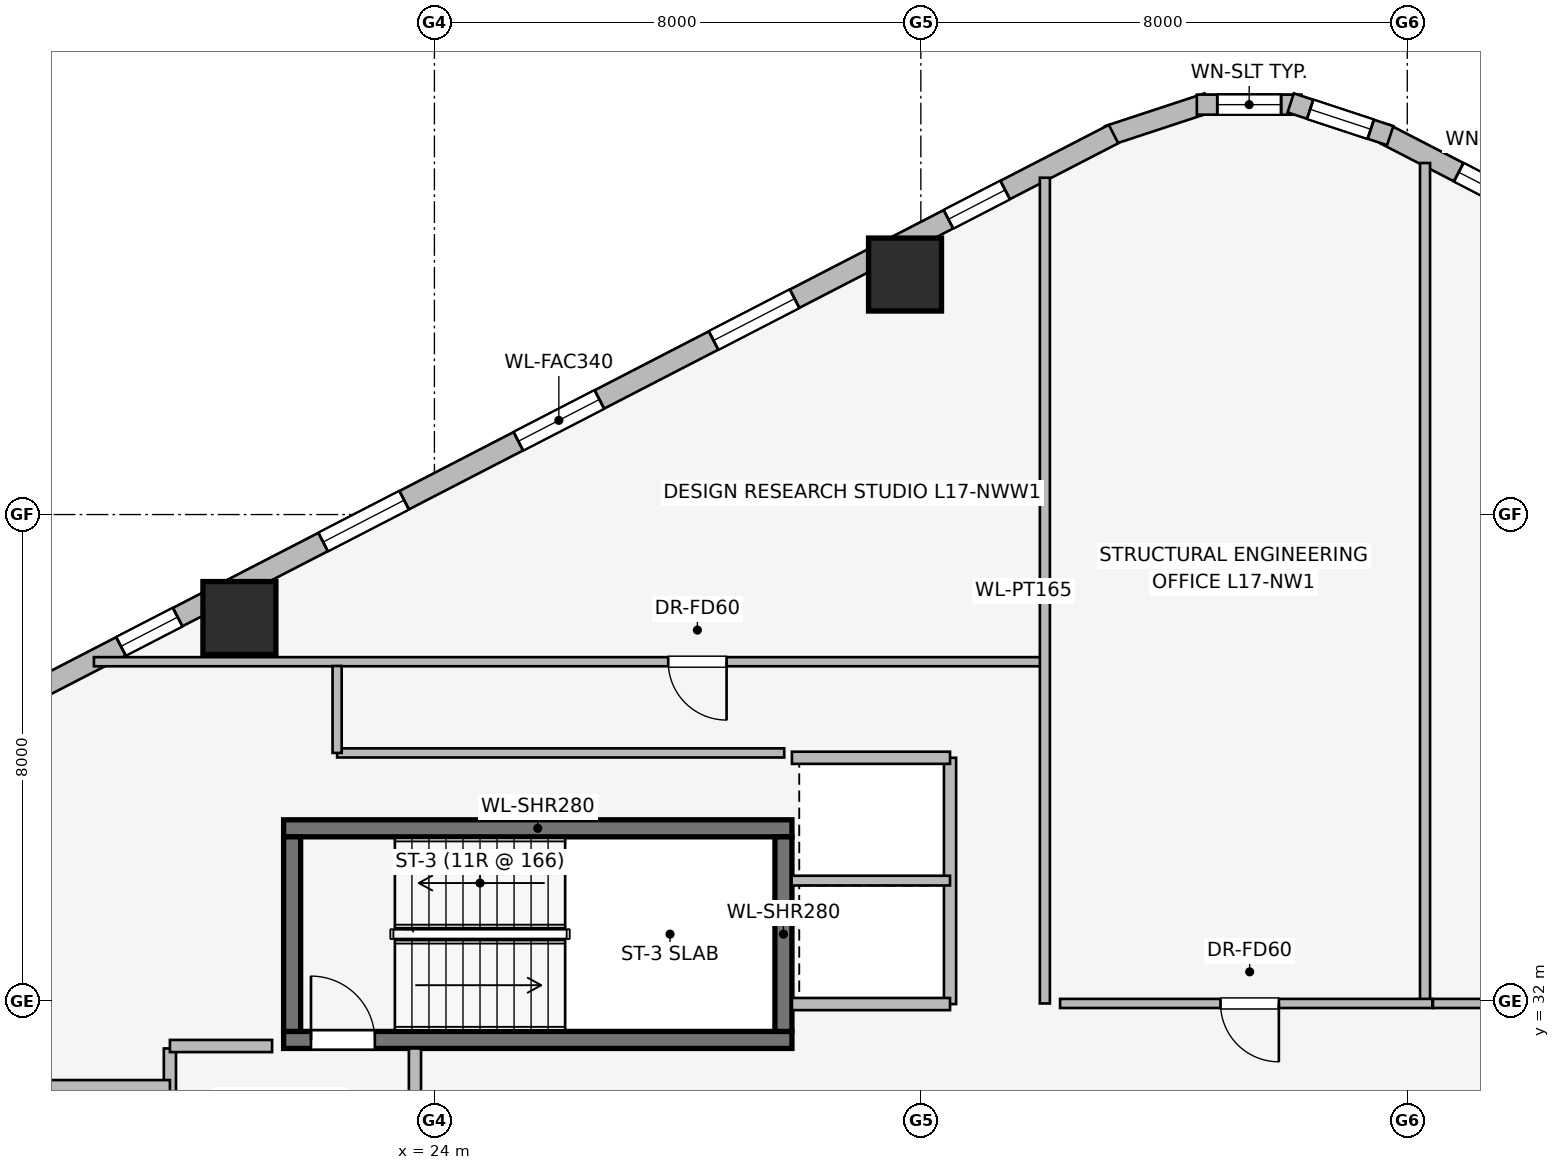
"""IFC4 building model, lengths in metres.
Left out: names, types, materials, properties, quantities, classifications, styles, units other than length and angle.
Written with IfcOpenShell. Run it as: python <this file> out.ifc"""

import sys

from ifc_helpers import new_model, si_unit, direction, frame, frame_2d, origin, origin_2d, place, context, subcontext, project, spatial, rectangle, extrude, element, fill, save


model = new_model("IFC4")
c1 = context("Model", 3, precision=1e-05, world=origin(), true_north=direction((0.0, 1.0)))
c2 = subcontext(c1, "Body", "Model", "MODEL_VIEW")
j1 = project(units=[si_unit("LENGTHUNIT", "METRE"), si_unit("PLANEANGLEUNIT", "RADIAN")], contexts=[c1])
p1 = place(None, origin())
s1 = spatial("IfcSite", under=j1, at=p1, CompositionType="ELEMENT")
p2 = place(p1, origin())
s2 = spatial("IfcBuilding", under=s1, at=p2, CompositionType="ELEMENT")
p3 = place(p2, frame((0.0, 0.0, 67.15)))
s3 = spatial("IfcBuildingStorey", under=s2, at=p3, CompositionType="ELEMENT", Elevation=67.15)
p4 = place(p3, frame((21.52, 31.36, 0.0), z_axis=(0.0, 0.0, 1.0), x_axis=(1.0, 0.0, 0.0)))
e1 = element("IfcWall", 1, at=p4, inside=s3, PredefinedType="SHEAR", context=c2, shape_type="SweptSolid", body=[
    extrude(rectangle(XDim=8.36, YDim=0.28, at=frame_2d((4.18, 0.0))), origin(), (0.0, 0.0, 1.0), 3.65),
])
p5 = place(p4, frame((0.45, 0.0, 0.0)))
e2 = element("IfcOpeningElement", 2, at=p5, cuts=e1, PredefinedType="OPENING", context=c2, shape_type="SweptSolid", body=[
    extrude(rectangle(XDim=1.05, YDim=2.0, at=frame_2d((0.525, 1.0))), frame((0.0, 0.15, 0.0), z_axis=(0.0, -1.0, 0.0), x_axis=(1.0, 0.0, 0.0)), (0.0, 0.0, 1.0), 0.3),
])
p6 = place(p3, frame((29.88, 34.84, 0.0), z_axis=(0.0, 0.0, 1.0), x_axis=(-1.0, 0.0, 0.0)))
e3 = element("IfcWall", 3, at=p6, inside=s3, PredefinedType="SHEAR", context=c2, shape_type="SweptSolid", body=[
    extrude(rectangle(XDim=8.36, YDim=0.28, at=frame_2d((4.18, 0.0))), origin(), (0.0, 0.0, 1.0), 3.65),
])
for number, where, z_axis, x_axis in (
    (4, (21.66, 34.7, 0.0), (0.0, 0.0, 1.0), (0.0, -1.0, 0.0)),
    (5, (29.74, 31.5, 0.0), (0.0, 0.0, 1.0), (0.0, 1.0, 0.0)),
):
    element("IfcWall", number, at=place(p3, frame(where, z_axis=z_axis, x_axis=x_axis)), inside=s3, PredefinedType="SHEAR", context=c2, shape_type="SweptSolid", body=[
        extrude(rectangle(XDim=3.2, YDim=0.28, at=frame_2d((1.6, 0.0))), origin(), (0.0, 0.0, 1.0), 3.65),
    ])
for number, where, z_axis, x_axis in (
    (6, (31.74, 43.947, 0.0), (0.0, 0.0, 1.0), (1.0, 0.0, 0.0)),
    (7, (20.793, 38.298, 0.0), (0.0, 0.0, 1.0), (1.0, 0.0, 0.0)),
):
    element("IfcColumn", number, at=place(p3, frame(where, z_axis=z_axis, x_axis=x_axis)), inside=s3, PredefinedType="COLUMN", context=c2, shape_type="SweptSolid", body=[
        extrude(rectangle(XDim=1.2, YDim=1.2, at=origin_2d()), origin(), (0.0, 0.0, 1.0), 3.65),
    ])
p7 = place(p3, frame((39.631, 46.257, 0.0), z_axis=(0.0, 0.0, 1.0), x_axis=(0.888634413993, -0.458616264721, 0.0)))
e8 = element("IfcWall", 8, at=p7, inside=s3, PredefinedType="STANDARD", context=c2, shape_type="SweptSolid", body=[
    extrude(rectangle(XDim=20.531, YDim=0.34, at=frame_2d((10.266, 0.0))), origin(), (0.0, 0.0, 1.0), 2.684),
])
p8 = place(p7, frame((1.367, 0.0, 0.75)))
e9 = element("IfcOpeningElement", 9, at=p8, cuts=e8, PredefinedType="OPENING", context=c2, shape_type="SweptSolid", body=[
    extrude(rectangle(XDim=1.8, YDim=1.5, at=frame_2d((0.9, 0.75))), frame((0.0, 0.18, 0.0), z_axis=(0.0, -1.0, 0.0), x_axis=(1.0, 0.0, 0.0)), (0.0, 0.0, 1.0), 0.36),
])
p9 = place(p7, frame((5.207, 0.0, 0.75)))
e10 = element("IfcOpeningElement", 10, at=p9, cuts=e8, PredefinedType="OPENING", context=c2, shape_type="SweptSolid", body=[
    extrude(rectangle(XDim=1.5, YDim=1.5, at=frame_2d((0.75, 0.75))), frame((0.0, 0.18, 0.0), z_axis=(0.0, -1.0, 0.0), x_axis=(1.0, 0.0, 0.0)), (0.0, 0.0, 1.0), 0.36),
])
p10 = place(p7, frame((7.429, 0.0, 0.75)))
e11 = element("IfcOpeningElement", 11, at=p10, cuts=e8, PredefinedType="OPENING", context=c2, shape_type="SweptSolid", body=[
    extrude(rectangle(XDim=1.5, YDim=1.5, at=frame_2d((0.75, 0.75))), frame((0.0, 0.18, 0.0), z_axis=(0.0, -1.0, 0.0), x_axis=(1.0, 0.0, 0.0)), (0.0, 0.0, 1.0), 0.36),
])
p11 = place(p7, frame((9.65, 0.0, 0.75)))
e12 = element("IfcOpeningElement", 12, at=p11, cuts=e8, PredefinedType="OPENING", context=c2, shape_type="SweptSolid", body=[
    extrude(rectangle(XDim=1.5, YDim=1.5, at=frame_2d((0.75, 0.75))), frame((0.0, 0.18, 0.0), z_axis=(0.0, -1.0, 0.0), x_axis=(1.0, 0.0, 0.0)), (0.0, 0.0, 1.0), 0.36),
])
p12 = place(p7, frame((13.06, 0.0, 0.75)))
e13 = element("IfcOpeningElement", 13, at=p12, cuts=e8, PredefinedType="OPENING", context=c2, shape_type="SweptSolid", body=[
    extrude(rectangle(XDim=1.8, YDim=1.5, at=frame_2d((0.9, 0.75))), frame((0.0, 0.18, 0.0), z_axis=(0.0, -1.0, 0.0), x_axis=(1.0, 0.0, 0.0)), (0.0, 0.0, 1.0), 0.36),
])
p13 = place(p7, frame((17.98, 0.0, 0.75)))
e14 = element("IfcOpeningElement", 14, at=p13, cuts=e8, PredefinedType="OPENING", context=c2, shape_type="SweptSolid", body=[
    extrude(rectangle(XDim=1.5, YDim=1.5, at=frame_2d((0.75, 0.75))), frame((0.0, 0.18, 0.0), z_axis=(0.0, -1.0, 0.0), x_axis=(1.0, 0.0, 0.0)), (0.0, 0.0, 1.0), 0.36),
])
p14 = place(p3, frame((35.081, 46.231, 0.0), z_axis=(0.0, 0.0, 1.0), x_axis=(0.94976901097, 0.312951794691, 0.0)))
e15 = element("IfcWall", 15, at=p14, inside=s3, PredefinedType="STANDARD", context=c2, shape_type="SweptSolid", body=[
    extrude(rectangle(XDim=1.722, YDim=0.33, at=frame_2d((0.861, 0.0))), origin(), (0.0, 0.0, 1.0), 3.39),
])
p15 = place(p3, frame((36.539, 46.741, 0.0), z_axis=(0.0, 0.0, 1.0), x_axis=(1.0, 0.0, 0.0)))
e16 = element("IfcWall", 16, at=p15, inside=s3, PredefinedType="STANDARD", context=c2, shape_type="SweptSolid", body=[
    extrude(rectangle(XDim=1.722, YDim=0.33, at=frame_2d((0.861, 0.0))), origin(), (0.0, 0.0, 1.0), 3.39),
])
p16 = place(p15, frame((0.336, 0.0, 0.75)))
e17 = element("IfcOpeningElement", 17, at=p16, cuts=e16, PredefinedType="OPENING", context=c2, shape_type="SweptSolid", body=[
    extrude(rectangle(XDim=1.05, YDim=1.4, at=frame_2d((0.525, 0.7))), frame((0.0, 0.175, 0.0), z_axis=(0.0, -1.0, 0.0), x_axis=(1.0, 0.0, 0.0)), (0.0, 0.0, 1.0), 0.35),
])
p17 = place(p3, frame((38.083, 46.77, 0.0), z_axis=(0.0, 0.0, 1.0), x_axis=(0.94976901097, -0.312951794691, 0.0)))
e18 = element("IfcWall", 18, at=p17, inside=s3, PredefinedType="STANDARD", context=c2, shape_type="SweptSolid", body=[
    extrude(rectangle(XDim=1.722, YDim=0.33, at=frame_2d((0.861, 0.0))), origin(), (0.0, 0.0, 1.0), 3.39),
])
p18 = place(p17, frame((0.336, 0.0, 0.75)))
e19 = element("IfcOpeningElement", 19, at=p18, cuts=e18, PredefinedType="OPENING", context=c2, shape_type="SweptSolid", body=[
    extrude(rectangle(XDim=1.05, YDim=1.4, at=frame_2d((0.525, 0.7))), frame((0.0, 0.175, 0.0), z_axis=(0.0, -1.0, 0.0), x_axis=(1.0, 0.0, 0.0)), (0.0, 0.0, 1.0), 0.35),
])
p19 = place(p3, frame((16.924, 36.841, 0.0), z_axis=(0.0, 0.0, 1.0), x_axis=(0.888634413993, 0.458616264721, 0.0)))
e20 = element("IfcWall", 20, at=p19, inside=s3, PredefinedType="STANDARD", context=c2, shape_type="SweptSolid", body=[
    extrude(rectangle(XDim=20.531, YDim=0.34, at=frame_2d((10.266, 0.0))), origin(), (0.0, 0.0, 1.0), 2.684),
])
p20 = place(p19, frame((2.161, 0.0, 0.75)))
e21 = element("IfcOpeningElement", 21, at=p20, cuts=e20, PredefinedType="OPENING", context=c2, shape_type="SweptSolid", body=[
    extrude(rectangle(XDim=1.05, YDim=1.4, at=frame_2d((0.525, 0.7))), frame((0.0, 0.18, 0.0), z_axis=(0.0, -1.0, 0.0), x_axis=(1.0, 0.0, 0.0)), (0.0, 0.0, 1.0), 0.36),
])
p21 = place(p19, frame((5.903, 0.0, 0.75)))
e22 = element("IfcOpeningElement", 22, at=p21, cuts=e20, PredefinedType="OPENING", context=c2, shape_type="SweptSolid", body=[
    extrude(rectangle(XDim=1.5, YDim=1.5, at=frame_2d((0.75, 0.75))), frame((0.0, 0.18, 0.0), z_axis=(0.0, -1.0, 0.0), x_axis=(1.0, 0.0, 0.0)), (0.0, 0.0, 1.0), 0.36),
])
p22 = place(p19, frame((9.516, 0.0, 0.75)))
e23 = element("IfcOpeningElement", 23, at=p22, cuts=e20, PredefinedType="OPENING", context=c2, shape_type="SweptSolid", body=[
    extrude(rectangle(XDim=1.5, YDim=1.5, at=frame_2d((0.75, 0.75))), frame((0.0, 0.18, 0.0), z_axis=(0.0, -1.0, 0.0), x_axis=(1.0, 0.0, 0.0)), (0.0, 0.0, 1.0), 0.36),
])
p23 = place(p19, frame((13.129, 0.0, 0.75)))
e24 = element("IfcOpeningElement", 24, at=p23, cuts=e20, PredefinedType="OPENING", context=c2, shape_type="SweptSolid", body=[
    extrude(rectangle(XDim=1.5, YDim=1.5, at=frame_2d((0.75, 0.75))), frame((0.0, 0.18, 0.0), z_axis=(0.0, -1.0, 0.0), x_axis=(1.0, 0.0, 0.0)), (0.0, 0.0, 1.0), 0.36),
])
p24 = place(p19, frame((17.476, 0.0, 0.75)))
e25 = element("IfcOpeningElement", 25, at=p24, cuts=e20, PredefinedType="OPENING", context=c2, shape_type="SweptSolid", body=[
    extrude(rectangle(XDim=1.05, YDim=1.4, at=frame_2d((0.525, 0.7))), frame((0.0, 0.18, 0.0), z_axis=(0.0, -1.0, 0.0), x_axis=(1.0, 0.0, 0.0)), (0.0, 0.0, 1.0), 0.36),
])
p25 = place(p3, frame((19.65, 25.68, 0.0), z_axis=(0.0, 0.0, 1.0), x_axis=(0.0, 1.0, 0.0)))
e26 = element("IfcWall", 26, at=p25, inside=s3, PredefinedType="PARTITIONING", context=c2, shape_type="SweptSolid", body=[
    extrude(rectangle(XDim=5.54, YDim=0.2, at=frame_2d((2.77, 0.0))), origin(), (0.0, 0.0, 1.0), 3.39),
])
p26 = place(p25, frame((0.62, 0.0, 0.0)))
e27 = element("IfcOpeningElement", 27, at=p26, cuts=e26, PredefinedType="OPENING", context=c2, shape_type="SweptSolid", body=[
    extrude(rectangle(XDim=1.1, YDim=2.2, at=frame_2d((0.55, 1.1))), frame((0.0, 0.11, 0.0), z_axis=(0.0, -1.0, 0.0), x_axis=(1.0, 0.0, 0.0)), (0.0, 0.0, 1.0), 0.22),
])
p27 = place(p25, frame((3.12, 0.0, 0.0)))
e28 = element("IfcOpeningElement", 28, at=p27, cuts=e26, PredefinedType="OPENING", context=c2, shape_type="SweptSolid", body=[
    extrude(rectangle(XDim=1.1, YDim=2.2, at=frame_2d((0.55, 1.1))), frame((0.0, 0.11, 0.0), z_axis=(0.0, -1.0, 0.0), x_axis=(1.0, 0.0, 0.0)), (0.0, 0.0, 1.0), 0.22),
])
p28 = place(p3, frame((23.68, 25.68, 0.0), z_axis=(0.0, 0.0, 1.0), x_axis=(0.0, 1.0, 0.0)))
e29 = element("IfcWall", 29, at=p28, inside=s3, PredefinedType="PARTITIONING", context=c2, shape_type="SweptSolid", body=[
    extrude(rectangle(XDim=5.54, YDim=0.2, at=frame_2d((2.77, 0.0))), origin(), (0.0, 0.0, 1.0), 3.39),
])
p29 = place(p28, frame((1.8, 0.0, 0.0)))
e30 = element("IfcOpeningElement", 30, at=p29, cuts=e29, PredefinedType="OPENING", context=c2, shape_type="SweptSolid", body=[
    extrude(rectangle(XDim=1.05, YDim=2.0, at=frame_2d((0.525, 1.0))), frame((0.0, 0.11, 0.0), z_axis=(0.0, -1.0, 0.0), x_axis=(1.0, 0.0, 0.0)), (0.0, 0.0, 1.0), 0.22),
])
p30 = place(p3, frame((21.33, 31.26, 0.0), z_axis=(0.0, 0.0, 1.0), x_axis=(-1.0, 0.0, 0.0)))
e31 = element("IfcWall", 31, at=p30, inside=s3, PredefinedType="PARTITIONING", context=c2, shape_type="SweptSolid", body=[
    extrude(rectangle(XDim=1.68, YDim=0.2, at=frame_2d((0.84, 0.0))), origin(), (0.0, 0.0, 1.0), 3.39),
])
p31 = place(p3, frame((19.65, 30.6, 0.0), z_axis=(0.0, 0.0, 1.0), x_axis=(-1.0, 0.0, 0.0)))
e32 = element("IfcWall", 32, at=p31, inside=s3, PredefinedType="PARTITIONING", context=c2, shape_type="SweptSolid", body=[
    extrude(rectangle(XDim=2.5, YDim=0.2, at=frame_2d((1.25, 0.0))), origin(), (0.0, 0.0, 1.0), 2.29),
])
p32 = place(p3, frame((32.48, 31.95, 0.0), z_axis=(0.0, 0.0, 1.0), x_axis=(0.0, 1.0, 0.0)))
e33 = element("IfcWall", 33, at=p32, inside=s3, PredefinedType="PARTITIONING", context=c2, shape_type="SweptSolid", body=[
    extrude(rectangle(XDim=4.05, YDim=0.2, at=frame_2d((2.025, 0.0))), origin(), (0.0, 0.0, 1.0), 2.513),
])
for number, where, z_axis, x_axis in (
    (34, (29.88, 36.0, 0.0), (0.0, 0.0, 1.0), (1.0, 0.0, 0.0)),
    (35, (32.48, 31.95, 0.0), (0.0, 0.0, 1.0), (-1.0, 0.0, 0.0)),
):
    element("IfcWall", number, at=place(p3, frame(where, z_axis=z_axis, x_axis=x_axis)), inside=s3, PredefinedType="PARTITIONING", context=c2, shape_type="SweptSolid", body=[
        extrude(rectangle(XDim=2.6, YDim=0.2, at=frame_2d((1.3, 0.0))), origin(), (0.0, 0.0, 1.0), 3.39),
    ])
p33 = place(p3, frame((29.875, 33.98, 0.0), z_axis=(0.0, 0.0, 1.0), x_axis=(1.0, 0.0, 0.0)))
e36 = element("IfcWall", 36, at=p33, inside=s3, PredefinedType="PARTITIONING", context=c2, shape_type="SweptSolid", body=[
    extrude(rectangle(XDim=2.605, YDim=0.16, at=frame_2d((1.302, 0.0))), origin(), (0.0, 0.0, 1.0), 3.39),
])
p34 = place(p3, frame((34.0, 37.58, 0.0), z_axis=(0.0, 0.0, 1.0), x_axis=(-1.0, 0.0, 0.0)))
e37 = element("IfcWall", 37, at=p34, inside=s3, PredefinedType="PARTITIONING", context=c2, shape_type="SweptSolid", body=[
    extrude(rectangle(XDim=15.6, YDim=0.15, at=frame_2d((7.8, 0.0))), origin(), (0.0, 0.0, 1.0), 3.39),
])
p35 = place(p34, frame((5.195, 0.0, 0.0)))
e38 = element("IfcOpeningElement", 38, at=p35, cuts=e37, PredefinedType="OPENING", context=c2, shape_type="SweptSolid", body=[
    extrude(rectangle(XDim=0.96, YDim=2.0, at=frame_2d((0.48, 1.0))), frame((0.0, 0.085, 0.0), z_axis=(0.0, -1.0, 0.0), x_axis=(1.0, 0.0, 0.0)), (0.0, 0.0, 1.0), 0.17),
])
p36 = place(p3, frame((34.04, 31.96, 0.0), z_axis=(0.0, 0.0, 1.0), x_axis=(0.0, 1.0, 0.0)))
e39 = element("IfcWall", 39, at=p36, inside=s3, PredefinedType="PARTITIONING", context=c2, shape_type="SweptSolid", body=[
    extrude(rectangle(XDim=13.579, YDim=0.165, at=frame_2d((6.79, 0.0))), origin(), (0.0, 0.0, 1.0), 3.39),
])
p37 = place(p3, frame((40.292, 31.97, 0.0), z_axis=(0.0, 0.0, 1.0), x_axis=(0.0, 1.0, 0.0)))
e40 = element("IfcWall", 40, at=p37, inside=s3, PredefinedType="PARTITIONING", context=c2, shape_type="SweptSolid", body=[
    extrude(rectangle(XDim=13.811, YDim=0.165, at=frame_2d((6.906, 0.0))), origin(), (0.0, 0.0, 1.0), 2.513),
])
p38 = place(p3, frame((40.412, 31.96, 0.0), z_axis=(0.0, 0.0, 1.0), x_axis=(-1.0, 0.0, 0.0)))
e41 = element("IfcWall", 41, at=p38, inside=s3, PredefinedType="PARTITIONING", context=c2, shape_type="SweptSolid", body=[
    extrude(rectangle(XDim=6.122, YDim=0.15, at=frame_2d((3.061, 0.0))), origin(), (0.0, 0.0, 1.0), 3.39),
])
p39 = place(p38, frame((2.524, 0.0, 0.0)))
e42 = element("IfcOpeningElement", 42, at=p39, cuts=e41, PredefinedType="OPENING", context=c2, shape_type="SweptSolid", body=[
    extrude(rectangle(XDim=0.96, YDim=2.0, at=frame_2d((0.48, 1.0))), frame((0.0, 0.085, 0.0), z_axis=(0.0, -1.0, 0.0), x_axis=(1.0, 0.0, 0.0)), (0.0, 0.0, 1.0), 0.17),
])
p40 = place(p3, frame((50.111, 31.96, 0.0), z_axis=(0.0, 0.0, 1.0), x_axis=(-1.0, 0.0, 0.0)))
e43 = element("IfcWall", 43, at=p40, inside=s3, PredefinedType="PARTITIONING", context=c2, shape_type="SweptSolid", body=[
    extrude(rectangle(XDim=9.689, YDim=0.15, at=frame_2d((4.844, 0.0))), origin(), (0.0, 0.0, 1.0), 3.39),
])
p41 = place(p40, frame((4.422, 0.0, 0.0)))
e44 = element("IfcOpeningElement", 44, at=p41, cuts=e43, PredefinedType="OPENING", context=c2, shape_type="SweptSolid", body=[
    extrude(rectangle(XDim=0.96, YDim=2.0, at=frame_2d((0.48, 1.0))), frame((0.0, 0.085, 0.0), z_axis=(0.0, -1.0, 0.0), x_axis=(1.0, 0.0, 0.0)), (0.0, 0.0, 1.0), 0.17),
])
p42 = place(p3, frame((29.753, 36.08, 0.0), z_axis=(0.0, 0.0, 1.0), x_axis=(-1.0, 0.0, 0.0)))
e45 = element("IfcWall", 45, at=p42, inside=s3, PredefinedType="PARTITIONING", context=c2, shape_type="SweptSolid", body=[
    extrude(rectangle(XDim=7.353, YDim=0.15, at=frame_2d((3.677, 0.0))), origin(), (0.0, 0.0, 1.0), 3.39),
])
p43 = place(p3, frame((22.4, 36.08, 0.0), z_axis=(0.0, 0.0, 1.0), x_axis=(0.0, 1.0, 0.0)))
e46 = element("IfcWall", 46, at=p43, inside=s3, PredefinedType="PARTITIONING", context=c2, shape_type="SweptSolid", body=[
    extrude(rectangle(XDim=1.43, YDim=0.15, at=frame_2d((0.715, 0.0))), origin(), (0.0, 0.0, 1.0), 3.39),
])
p44 = place(p8, origin())
e47 = element("IfcWindow", 47, at=p44, inside=s3, PartitioningType="SINGLE_PANEL", PredefinedType="WINDOW", context=c2, shape_type="SweptSolid", body=[
    extrude(rectangle(XDim=1.8, YDim=1.5, at=frame_2d((0.9, 0.75))), frame((0.0, 0.03, 0.0), z_axis=(0.0, -1.0, 0.0), x_axis=(1.0, 0.0, 0.0)), (0.0, 0.0, 1.0), 0.06),
])
fill(e9, e47)
p45 = place(p16, origin())
e48 = element("IfcWindow", 48, at=p45, inside=s3, PartitioningType="SINGLE_PANEL", PredefinedType="WINDOW", context=c2, shape_type="SweptSolid", body=[
    extrude(rectangle(XDim=1.05, YDim=1.4, at=frame_2d((0.525, 0.7))), frame((0.0, 0.03, 0.0), z_axis=(0.0, -1.0, 0.0), x_axis=(1.0, 0.0, 0.0)), (0.0, 0.0, 1.0), 0.06),
])
fill(e17, e48)
p46 = place(p18, origin())
e49 = element("IfcWindow", 49, at=p46, inside=s3, PartitioningType="SINGLE_PANEL", PredefinedType="WINDOW", context=c2, shape_type="SweptSolid", body=[
    extrude(rectangle(XDim=1.05, YDim=1.4, at=frame_2d((0.525, 0.7))), frame((0.0, 0.03, 0.0), z_axis=(0.0, -1.0, 0.0), x_axis=(1.0, 0.0, 0.0)), (0.0, 0.0, 1.0), 0.06),
])
fill(e19, e49)
p47 = place(p20, origin())
e50 = element("IfcWindow", 50, at=p47, inside=s3, PartitioningType="SINGLE_PANEL", PredefinedType="WINDOW", context=c2, shape_type="SweptSolid", body=[
    extrude(rectangle(XDim=1.05, YDim=1.4, at=frame_2d((0.525, 0.7))), frame((0.0, 0.03, 0.0), z_axis=(0.0, -1.0, 0.0), x_axis=(1.0, 0.0, 0.0)), (0.0, 0.0, 1.0), 0.06),
])
fill(e21, e50)
p48 = place(p21, origin())
e51 = element("IfcWindow", 51, at=p48, inside=s3, PartitioningType="SINGLE_PANEL", PredefinedType="WINDOW", context=c2, shape_type="SweptSolid", body=[
    extrude(rectangle(XDim=1.5, YDim=1.5, at=frame_2d((0.75, 0.75))), frame((0.0, 0.03, 0.0), z_axis=(0.0, -1.0, 0.0), x_axis=(1.0, 0.0, 0.0)), (0.0, 0.0, 1.0), 0.06),
])
fill(e22, e51)
p49 = place(p22, origin())
e52 = element("IfcWindow", 52, at=p49, inside=s3, PartitioningType="SINGLE_PANEL", PredefinedType="WINDOW", context=c2, shape_type="SweptSolid", body=[
    extrude(rectangle(XDim=1.5, YDim=1.5, at=frame_2d((0.75, 0.75))), frame((0.0, 0.03, 0.0), z_axis=(0.0, -1.0, 0.0), x_axis=(1.0, 0.0, 0.0)), (0.0, 0.0, 1.0), 0.06),
])
fill(e23, e52)
p50 = place(p23, origin())
e53 = element("IfcWindow", 53, at=p50, inside=s3, PartitioningType="SINGLE_PANEL", PredefinedType="WINDOW", context=c2, shape_type="SweptSolid", body=[
    extrude(rectangle(XDim=1.5, YDim=1.5, at=frame_2d((0.75, 0.75))), frame((0.0, 0.03, 0.0), z_axis=(0.0, -1.0, 0.0), x_axis=(1.0, 0.0, 0.0)), (0.0, 0.0, 1.0), 0.06),
])
fill(e24, e53)
p51 = place(p24, origin())
e54 = element("IfcWindow", 54, at=p51, inside=s3, PartitioningType="SINGLE_PANEL", PredefinedType="WINDOW", context=c2, shape_type="SweptSolid", body=[
    extrude(rectangle(XDim=1.05, YDim=1.4, at=frame_2d((0.525, 0.7))), frame((0.0, 0.03, 0.0), z_axis=(0.0, -1.0, 0.0), x_axis=(1.0, 0.0, 0.0)), (0.0, 0.0, 1.0), 0.06),
])
fill(e25, e54)
p52 = place(p5, origin())
e55 = element("IfcDoor", 55, at=p52, inside=s3, OperationType="SINGLE_SWING_LEFT", PredefinedType="DOOR", context=c2, shape_type="SweptSolid", body=[
    extrude(rectangle(XDim=1.05, YDim=2.0, at=frame_2d((0.525, 1.0))), frame((0.0, 0.025, 0.0), z_axis=(0.0, -1.0, 0.0), x_axis=(1.0, 0.0, 0.0)), (0.0, 0.0, 1.0), 0.05),
])
fill(e2, e55)
p53 = place(p35, origin())
e56 = element("IfcDoor", 56, at=p53, inside=s3, OperationType="SINGLE_SWING_LEFT", PredefinedType="DOOR", context=c2, shape_type="SweptSolid", body=[
    extrude(rectangle(XDim=0.96, YDim=2.0, at=frame_2d((0.48, 1.0))), frame((0.0, 0.025, 0.0), z_axis=(0.0, -1.0, 0.0), x_axis=(1.0, 0.0, 0.0)), (0.0, 0.0, 1.0), 0.05),
])
fill(e38, e56)
p54 = place(p39, origin())
e57 = element("IfcDoor", 57, at=p54, inside=s3, OperationType="SINGLE_SWING_LEFT", PredefinedType="DOOR", context=c2, shape_type="SweptSolid", body=[
    extrude(rectangle(XDim=0.96, YDim=2.0, at=frame_2d((0.48, 1.0))), frame((0.0, 0.025, 0.0), z_axis=(0.0, -1.0, 0.0), x_axis=(1.0, 0.0, 0.0)), (0.0, 0.0, 1.0), 0.05),
])
fill(e42, e57)
save(model, sys.argv[1])
